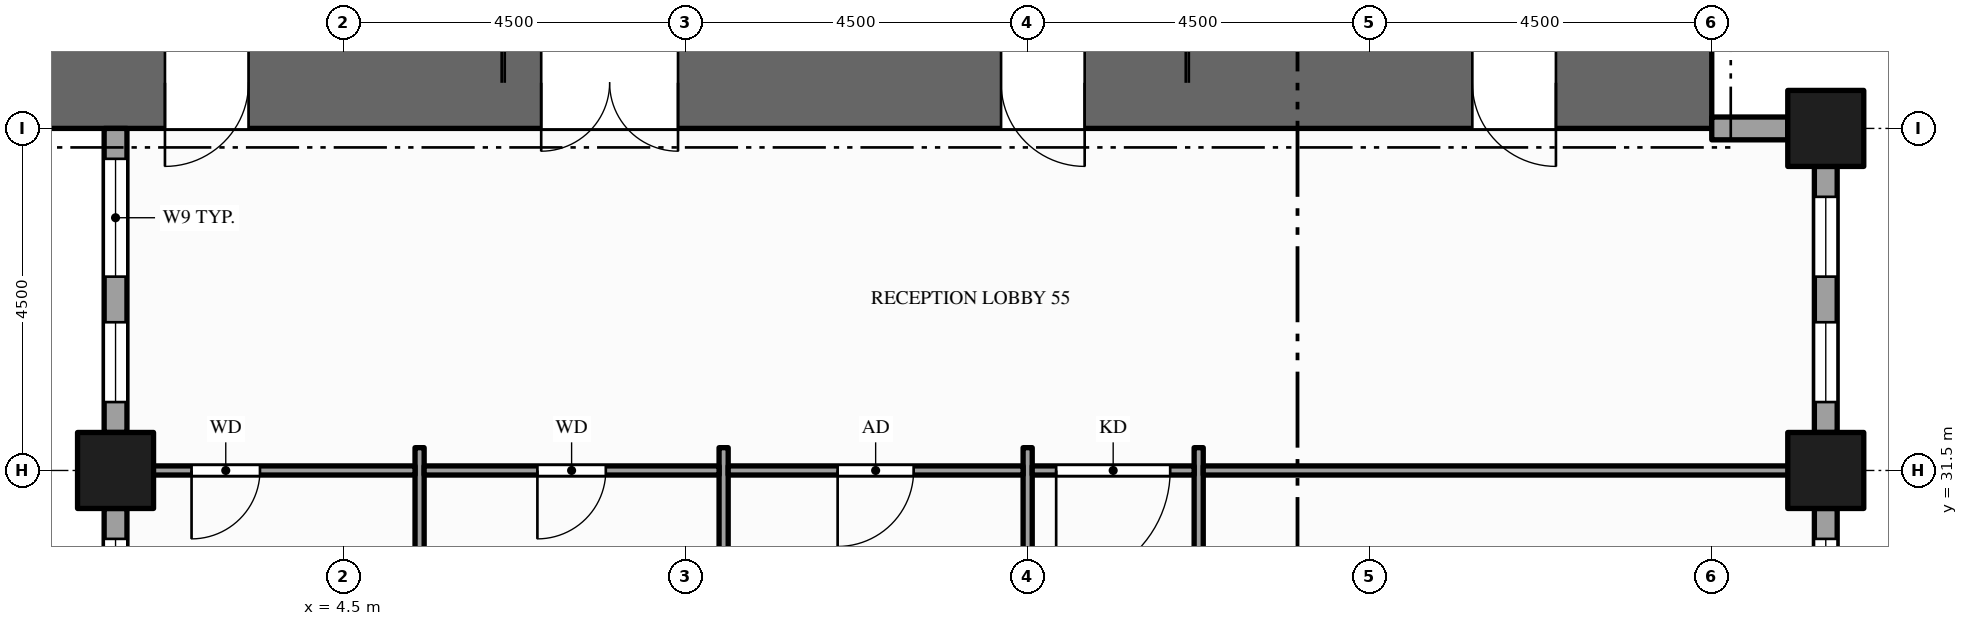
"""IFC4 building model, lengths in metres.
Left out: names, types, materials, properties, quantities, classifications, styles, units other than length and angle.
Written with IfcOpenShell. Run it as: python <this file> out.ifc"""

import sys

from ifc_helpers import new_model, si_unit, direction, frame, frame_2d, origin, origin_2d, place, context, subcontext, project, spatial, rectangle, hollow_rectangle, extrude, element, fill, save


model = new_model("IFC4")
c1 = context("Model", 3, precision=1e-05, world=origin(), true_north=direction((0.0, 1.0)))
c2 = subcontext(c1, "Body", "Model", "MODEL_VIEW")
j1 = project(units=[si_unit("LENGTHUNIT", "METRE"), si_unit("PLANEANGLEUNIT", "RADIAN")], contexts=[c1])
p1 = place(None, origin())
s1 = spatial("IfcSite", under=j1, at=p1, CompositionType="ELEMENT")
p2 = place(p1, origin())
s2 = spatial("IfcBuilding", under=s1, at=p2, CompositionType="ELEMENT")
p3 = place(p2, frame((0.0, 0.0, 119.0)))
s3 = spatial("IfcBuildingStorey", under=s2, at=p3, CompositionType="ELEMENT", Elevation=119.0)
p4 = place(p3, frame((0.0, 36.6, -0.15), z_axis=(0.0, 0.0, 1.0), x_axis=(1.0, 0.0, 0.0)))
e1 = element("IfcWall", 1, at=p4, inside=s3, PredefinedType="SHEAR", context=c2, shape_type="SweptSolid", body=[
    extrude(rectangle(XDim=22.5, YDim=1.2, at=frame_2d((11.25, 0.0))), origin(), (0.0, 0.0, 1.0), 4.0),
])
p5 = place(p4, frame((7.1, 0.0, 0.15)))
e2 = element("IfcOpeningElement", 2, at=p5, cuts=e1, PredefinedType="OPENING", context=c2, shape_type="SweptSolid", body=[
    extrude(rectangle(XDim=1.8, YDim=2.1, at=frame_2d((0.9, 1.05))), frame((0.0, 0.61, 0.0), z_axis=(0.0, -1.0, 0.0), x_axis=(1.0, 0.0, 0.0)), (0.0, 0.0, 1.0), 1.22),
])
p6 = place(p4, frame((13.15, 0.0, 0.15)))
e3 = element("IfcOpeningElement", 3, at=p6, cuts=e1, PredefinedType="OPENING", context=c2, shape_type="SweptSolid", body=[
    extrude(rectangle(XDim=1.1, YDim=2.1, at=frame_2d((0.55, 1.05))), frame((0.0, 0.61, 0.0), z_axis=(0.0, -1.0, 0.0), x_axis=(1.0, 0.0, 0.0)), (0.0, 0.0, 1.0), 1.22),
])
p7 = place(p4, frame((2.15, 0.0, 0.15)))
e4 = element("IfcOpeningElement", 4, at=p7, cuts=e1, PredefinedType="OPENING", context=c2, shape_type="SweptSolid", body=[
    extrude(rectangle(XDim=1.1, YDim=2.1, at=frame_2d((0.55, 1.05))), frame((0.0, 0.61, 0.0), z_axis=(0.0, -1.0, 0.0), x_axis=(1.0, 0.0, 0.0)), (0.0, 0.0, 1.0), 1.22),
])
p8 = place(p4, frame((19.35, 0.0, 0.15)))
e5 = element("IfcOpeningElement", 5, at=p8, cuts=e1, PredefinedType="OPENING", context=c2, shape_type="SweptSolid", body=[
    extrude(rectangle(XDim=1.1, YDim=2.1, at=frame_2d((0.55, 1.05))), frame((0.0, 0.61, 0.0), z_axis=(0.0, -1.0, 0.0), x_axis=(1.0, 0.0, 0.0)), (0.0, 0.0, 1.0), 1.22),
])
for number, where, z_axis, x_axis in (
    (6, (1.5, 31.5, -0.15), (0.0, 0.0, 1.0), (1.0, 0.0, 0.0)),
    (7, (24.0, 31.5, -0.15), (0.0, 0.0, 1.0), (1.0, 0.0, 0.0)),
    (8, (24.0, 36.0, -0.15), (0.0, 0.0, 1.0), (1.0, 0.0, 0.0)),
):
    element("IfcColumn", number, at=place(p3, frame(where, z_axis=z_axis, x_axis=x_axis)), inside=s3, PredefinedType="COLUMN", context=c2, shape_type="SweptSolid", body=[
        extrude(hollow_rectangle(XDim=1.0, YDim=1.0, WallThickness=0.05, at=origin_2d()), origin(), (0.0, 0.0, 1.0), 4.0),
    ])
p9 = place(p3, frame((24.0, 26.0, 0.0), z_axis=(0.0, 0.0, 1.0), x_axis=(0.0, 1.0, 0.0)))
e9 = element("IfcWall", 9, at=p9, inside=s3, PredefinedType="STANDARD", context=c2, shape_type="SweptSolid", body=[
    extrude(rectangle(XDim=5.0, YDim=0.3, at=frame_2d((2.5, 0.0))), origin(), (0.0, 0.0, 1.0), 3.154),
])
p10 = place(p9, frame((1.3, 0.0, 0.9)))
e10 = element("IfcOpeningElement", 10, at=p10, cuts=e9, PredefinedType="OPENING", context=c2, shape_type="SweptSolid", body=[
    extrude(rectangle(XDim=1.65, YDim=2.0, at=frame_2d((0.825, 1.0))), frame((0.0, 0.16, 0.0), z_axis=(0.0, -1.0, 0.0), x_axis=(1.0, 0.0, 0.0)), (0.0, 0.0, 1.0), 0.32),
])
p11 = place(p9, frame((3.55, 0.0, 0.9)))
e11 = element("IfcOpeningElement", 11, at=p11, cuts=e9, PredefinedType="OPENING", context=c2, shape_type="SweptSolid", body=[
    extrude(rectangle(XDim=1.05, YDim=2.0, at=frame_2d((0.525, 1.0))), frame((0.0, 0.16, 0.0), z_axis=(0.0, -1.0, 0.0), x_axis=(1.0, 0.0, 0.0)), (0.0, 0.0, 1.0), 0.32),
])
p12 = place(p3, frame((24.0, 32.0, 0.0), z_axis=(0.0, 0.0, 1.0), x_axis=(0.0, 1.0, 0.0)))
e12 = element("IfcWall", 12, at=p12, inside=s3, PredefinedType="STANDARD", context=c2, shape_type="SweptSolid", body=[
    extrude(rectangle(XDim=3.5, YDim=0.3, at=frame_2d((1.75, 0.0))), origin(), (0.0, 0.0, 1.0), 3.154),
])
p13 = place(p12, frame((0.4, 0.0, 0.9)))
e13 = element("IfcOpeningElement", 13, at=p13, cuts=e12, PredefinedType="OPENING", context=c2, shape_type="SweptSolid", body=[
    extrude(rectangle(XDim=1.05, YDim=2.0, at=frame_2d((0.525, 1.0))), frame((0.0, 0.16, 0.0), z_axis=(0.0, -1.0, 0.0), x_axis=(1.0, 0.0, 0.0)), (0.0, 0.0, 1.0), 0.32),
])
p14 = place(p12, frame((2.05, 0.0, 0.9)))
e14 = element("IfcOpeningElement", 14, at=p14, cuts=e12, PredefinedType="OPENING", context=c2, shape_type="SweptSolid", body=[
    extrude(rectangle(XDim=1.05, YDim=2.0, at=frame_2d((0.525, 1.0))), frame((0.0, 0.16, 0.0), z_axis=(0.0, -1.0, 0.0), x_axis=(1.0, 0.0, 0.0)), (0.0, 0.0, 1.0), 0.32),
])
p15 = place(p3, frame((23.5, 36.0, 0.0), z_axis=(0.0, 0.0, 1.0), x_axis=(-1.0, 0.0, 0.0)))
e15 = element("IfcWall", 15, at=p15, inside=s3, PredefinedType="STANDARD", context=c2, shape_type="SweptSolid", body=[
    extrude(rectangle(XDim=1.0, YDim=0.3, at=frame_2d((0.5, 0.0))), origin(), (0.0, 0.0, 1.0), 2.938),
])
p16 = place(p3, frame((1.5, 36.0, 0.0), z_axis=(0.0, 0.0, 1.0), x_axis=(0.0, -1.0, 0.0)))
e16 = element("IfcWall", 16, at=p16, inside=s3, PredefinedType="STANDARD", context=c2, shape_type="SweptSolid", body=[
    extrude(rectangle(XDim=4.0, YDim=0.3, at=frame_2d((2.0, 0.0))), origin(), (0.0, 0.0, 1.0), 3.154),
])
p17 = place(p16, frame((0.4, 0.0, 0.9)))
e17 = element("IfcOpeningElement", 17, at=p17, cuts=e16, PredefinedType="OPENING", context=c2, shape_type="SweptSolid", body=[
    extrude(rectangle(XDim=1.55, YDim=2.0, at=frame_2d((0.775, 1.0))), frame((0.0, 0.16, 0.0), z_axis=(0.0, -1.0, 0.0), x_axis=(1.0, 0.0, 0.0)), (0.0, 0.0, 1.0), 0.32),
])
p18 = place(p16, frame((2.55, 0.0, 0.9)))
e18 = element("IfcOpeningElement", 18, at=p18, cuts=e16, PredefinedType="OPENING", context=c2, shape_type="SweptSolid", body=[
    extrude(rectangle(XDim=1.05, YDim=2.0, at=frame_2d((0.525, 1.0))), frame((0.0, 0.16, 0.0), z_axis=(0.0, -1.0, 0.0), x_axis=(1.0, 0.0, 0.0)), (0.0, 0.0, 1.0), 0.32),
])
p19 = place(p3, frame((1.5, 31.0, 0.0), z_axis=(0.0, 0.0, 1.0), x_axis=(0.0, -1.0, 0.0)))
e19 = element("IfcWall", 19, at=p19, inside=s3, PredefinedType="STANDARD", context=c2, shape_type="SweptSolid", body=[
    extrude(rectangle(XDim=3.5, YDim=0.3, at=frame_2d((1.75, 0.0))), origin(), (0.0, 0.0, 1.0), 3.154),
])
p20 = place(p19, frame((0.4, 0.0, 0.9)))
e20 = element("IfcOpeningElement", 20, at=p20, cuts=e19, PredefinedType="OPENING", context=c2, shape_type="SweptSolid", body=[
    extrude(rectangle(XDim=1.05, YDim=2.0, at=frame_2d((0.525, 1.0))), frame((0.0, 0.16, 0.0), z_axis=(0.0, -1.0, 0.0), x_axis=(1.0, 0.0, 0.0)), (0.0, 0.0, 1.0), 0.32),
])
p21 = place(p19, frame((2.05, 0.0, 0.9)))
e21 = element("IfcOpeningElement", 21, at=p21, cuts=e19, PredefinedType="OPENING", context=c2, shape_type="SweptSolid", body=[
    extrude(rectangle(XDim=1.05, YDim=2.0, at=frame_2d((0.525, 1.0))), frame((0.0, 0.16, 0.0), z_axis=(0.0, -1.0, 0.0), x_axis=(1.0, 0.0, 0.0)), (0.0, 0.0, 1.0), 0.32),
])
for number, where, z_axis, x_axis in (
    (22, (5.5, 26.7, 0.0), (0.0, 0.0, 1.0), (0.0, 1.0, 0.0)),
    (23, (9.5, 26.7, 0.0), (0.0, 0.0, 1.0), (0.0, 1.0, 0.0)),
):
    element("IfcWall", number, at=place(p3, frame(where, z_axis=z_axis, x_axis=x_axis)), inside=s3, PredefinedType="PARTITIONING", context=c2, shape_type="SweptSolid", body=[
        extrude(rectangle(XDim=5.1, YDim=0.12, at=frame_2d((2.55, 0.0))), origin(), (0.0, 0.0, 1.0), 3.85),
    ])
p22 = place(p3, frame((13.5, 10.95, 0.0), z_axis=(0.0, 0.0, 1.0), x_axis=(0.0, 1.0, 0.0)))
e24 = element("IfcWall", 24, at=p22, inside=s3, PredefinedType="PARTITIONING", context=c2, shape_type="SweptSolid", body=[
    extrude(rectangle(XDim=20.85, YDim=0.12, at=frame_2d((10.425, 0.0))), origin(), (0.0, 0.0, 1.0), 2.6),
])
p23 = place(p22, frame((3.175, 0.0, 0.0)))
e25 = element("IfcOpeningElement", 25, at=p23, cuts=e24, PredefinedType="OPENING", context=c2, shape_type="SweptSolid", body=[
    extrude(rectangle(XDim=1.0, YDim=2.1, at=frame_2d((0.5, 1.05))), frame((0.0, 0.07, 0.0), z_axis=(0.0, -1.0, 0.0), x_axis=(1.0, 0.0, 0.0)), (0.0, 0.0, 1.0), 0.14),
])
p24 = place(p22, frame((10.68, 0.0, 0.0)))
e26 = element("IfcOpeningElement", 26, at=p24, cuts=e24, PredefinedType="OPENING", context=c2, shape_type="SweptSolid", body=[
    extrude(rectangle(XDim=1.8, YDim=2.1, at=frame_2d((0.9, 1.05))), frame((0.0, 0.07, 0.0), z_axis=(0.0, -1.0, 0.0), x_axis=(1.0, 0.0, 0.0)), (0.0, 0.0, 1.0), 0.14),
])
p25 = place(p3, frame((15.75, 10.95, 0.0), z_axis=(0.0, 0.0, 1.0), x_axis=(0.0, 1.0, 0.0)))
e27 = element("IfcWall", 27, at=p25, inside=s3, PredefinedType="PARTITIONING", context=c2, shape_type="SweptSolid", body=[
    extrude(rectangle(XDim=20.85, YDim=0.12, at=frame_2d((10.425, 0.0))), origin(), (0.0, 0.0, 1.0), 2.6),
])
p26 = place(p25, frame((17.8, 0.0, 0.0)))
e28 = element("IfcOpeningElement", 28, at=p26, cuts=e27, PredefinedType="OPENING", context=c2, shape_type="SweptSolid", body=[
    extrude(rectangle(XDim=1.0, YDim=2.1, at=frame_2d((0.5, 1.05))), frame((0.0, 0.07, 0.0), z_axis=(0.0, -1.0, 0.0), x_axis=(1.0, 0.0, 0.0)), (0.0, 0.0, 1.0), 0.14),
])
p27 = place(p25, frame((4.2, 0.0, 0.0)))
e29 = element("IfcOpeningElement", 29, at=p27, cuts=e27, PredefinedType="OPENING", context=c2, shape_type="SweptSolid", body=[
    extrude(rectangle(XDim=1.2, YDim=2.1, at=frame_2d((0.6, 1.05))), frame((0.0, 0.07, 0.0), z_axis=(0.0, -1.0, 0.0), x_axis=(1.0, 0.0, 0.0)), (0.0, 0.0, 1.0), 0.14),
])
p28 = place(p3, frame((1.65, 31.5, 0.0), z_axis=(0.0, 0.0, 1.0), x_axis=(1.0, 0.0, 0.0)))
e30 = element("IfcWall", 30, at=p28, inside=s3, PredefinedType="PARTITIONING", context=c2, shape_type="SweptSolid", body=[
    extrude(rectangle(XDim=3.79, YDim=0.12, at=frame_2d((1.895, 0.0))), origin(), (0.0, 0.0, 1.0), 2.938),
])
p29 = place(p28, frame((0.85, 0.0, 0.0)))
e31 = element("IfcOpeningElement", 31, at=p29, cuts=e30, PredefinedType="OPENING", context=c2, shape_type="SweptSolid", body=[
    extrude(rectangle(XDim=0.9, YDim=2.1, at=frame_2d((0.45, 1.05))), frame((0.0, 0.07, 0.0), z_axis=(0.0, -1.0, 0.0), x_axis=(1.0, 0.0, 0.0)), (0.0, 0.0, 1.0), 0.14),
])
p30 = place(p3, frame((5.56, 31.5, 0.0), z_axis=(0.0, 0.0, 1.0), x_axis=(1.0, 0.0, 0.0)))
e32 = element("IfcWall", 32, at=p30, inside=s3, PredefinedType="PARTITIONING", context=c2, shape_type="SweptSolid", body=[
    extrude(rectangle(XDim=3.88, YDim=0.12, at=frame_2d((1.94, 0.0))), origin(), (0.0, 0.0, 1.0), 2.938),
])
p31 = place(p30, frame((1.49, 0.0, 0.0)))
e33 = element("IfcOpeningElement", 33, at=p31, cuts=e32, PredefinedType="OPENING", context=c2, shape_type="SweptSolid", body=[
    extrude(rectangle(XDim=0.9, YDim=2.1, at=frame_2d((0.45, 1.05))), frame((0.0, 0.07, 0.0), z_axis=(0.0, -1.0, 0.0), x_axis=(1.0, 0.0, 0.0)), (0.0, 0.0, 1.0), 0.14),
])
p32 = place(p3, frame((9.56, 31.5, 0.0), z_axis=(0.0, 0.0, 1.0), x_axis=(1.0, 0.0, 0.0)))
e34 = element("IfcWall", 34, at=p32, inside=s3, PredefinedType="PARTITIONING", context=c2, shape_type="SweptSolid", body=[
    extrude(rectangle(XDim=3.88, YDim=0.12, at=frame_2d((1.94, 0.0))), origin(), (0.0, 0.0, 1.0), 2.938),
])
p33 = place(p32, frame((1.44, 0.0, 0.0)))
e35 = element("IfcOpeningElement", 35, at=p33, cuts=e34, PredefinedType="OPENING", context=c2, shape_type="SweptSolid", body=[
    extrude(rectangle(XDim=1.0, YDim=2.1, at=frame_2d((0.5, 1.05))), frame((0.0, 0.07, 0.0), z_axis=(0.0, -1.0, 0.0), x_axis=(1.0, 0.0, 0.0)), (0.0, 0.0, 1.0), 0.14),
])
p34 = place(p3, frame((13.56, 31.5, 0.0), z_axis=(0.0, 0.0, 1.0), x_axis=(1.0, 0.0, 0.0)))
e36 = element("IfcWall", 36, at=p34, inside=s3, PredefinedType="PARTITIONING", context=c2, shape_type="SweptSolid", body=[
    extrude(rectangle(XDim=2.13, YDim=0.12, at=frame_2d((1.065, 0.0))), origin(), (0.0, 0.0, 1.0), 2.938),
])
p35 = place(p34, frame((0.315, 0.0, 0.0)))
e37 = element("IfcOpeningElement", 37, at=p35, cuts=e36, PredefinedType="OPENING", context=c2, shape_type="SweptSolid", body=[
    extrude(rectangle(XDim=1.5, YDim=2.1, at=frame_2d((0.75, 1.05))), frame((0.0, 0.07, 0.0), z_axis=(0.0, -1.0, 0.0), x_axis=(1.0, 0.0, 0.0)), (0.0, 0.0, 1.0), 0.14),
])
p36 = place(p3, frame((15.81, 31.5, 0.0), z_axis=(0.0, 0.0, 1.0), x_axis=(1.0, 0.0, 0.0)))
e38 = element("IfcWall", 38, at=p36, inside=s3, PredefinedType="PARTITIONING", context=c2, shape_type="SweptSolid", body=[
    extrude(rectangle(XDim=8.04, YDim=0.12, at=frame_2d((4.02, 0.0))), origin(), (0.0, 0.0, 1.0), 2.938),
])
p37 = place(p11, origin())
e39 = element("IfcWindow", 39, at=p37, inside=s3, PartitioningType="SINGLE_PANEL", PredefinedType="WINDOW", context=c2, shape_type="SweptSolid", body=[
    extrude(rectangle(XDim=1.05, YDim=2.0, at=frame_2d((0.525, 1.0))), frame((0.0, 0.03, 0.0), z_axis=(0.0, -1.0, 0.0), x_axis=(1.0, 0.0, 0.0)), (0.0, 0.0, 1.0), 0.06),
])
fill(e11, e39)
p38 = place(p13, origin())
e40 = element("IfcWindow", 40, at=p38, inside=s3, PartitioningType="SINGLE_PANEL", PredefinedType="WINDOW", context=c2, shape_type="SweptSolid", body=[
    extrude(rectangle(XDim=1.05, YDim=2.0, at=frame_2d((0.525, 1.0))), frame((0.0, 0.03, 0.0), z_axis=(0.0, -1.0, 0.0), x_axis=(1.0, 0.0, 0.0)), (0.0, 0.0, 1.0), 0.06),
])
fill(e13, e40)
p39 = place(p14, origin())
e41 = element("IfcWindow", 41, at=p39, inside=s3, PartitioningType="SINGLE_PANEL", PredefinedType="WINDOW", context=c2, shape_type="SweptSolid", body=[
    extrude(rectangle(XDim=1.05, YDim=2.0, at=frame_2d((0.525, 1.0))), frame((0.0, 0.03, 0.0), z_axis=(0.0, -1.0, 0.0), x_axis=(1.0, 0.0, 0.0)), (0.0, 0.0, 1.0), 0.06),
])
fill(e14, e41)
p40 = place(p17, origin())
e42 = element("IfcWindow", 42, at=p40, inside=s3, PartitioningType="SINGLE_PANEL", PredefinedType="WINDOW", context=c2, shape_type="SweptSolid", body=[
    extrude(rectangle(XDim=1.55, YDim=2.0, at=frame_2d((0.775, 1.0))), frame((0.0, 0.03, 0.0), z_axis=(0.0, -1.0, 0.0), x_axis=(1.0, 0.0, 0.0)), (0.0, 0.0, 1.0), 0.06),
])
fill(e17, e42)
p41 = place(p18, origin())
e43 = element("IfcWindow", 43, at=p41, inside=s3, PartitioningType="SINGLE_PANEL", PredefinedType="WINDOW", context=c2, shape_type="SweptSolid", body=[
    extrude(rectangle(XDim=1.05, YDim=2.0, at=frame_2d((0.525, 1.0))), frame((0.0, 0.03, 0.0), z_axis=(0.0, -1.0, 0.0), x_axis=(1.0, 0.0, 0.0)), (0.0, 0.0, 1.0), 0.06),
])
fill(e18, e43)
p42 = place(p20, origin())
e44 = element("IfcWindow", 44, at=p42, inside=s3, PartitioningType="SINGLE_PANEL", PredefinedType="WINDOW", context=c2, shape_type="SweptSolid", body=[
    extrude(rectangle(XDim=1.05, YDim=2.0, at=frame_2d((0.525, 1.0))), frame((0.0, 0.03, 0.0), z_axis=(0.0, -1.0, 0.0), x_axis=(1.0, 0.0, 0.0)), (0.0, 0.0, 1.0), 0.06),
])
fill(e20, e44)
p43 = place(p5, origin())
e45 = element("IfcDoor", 45, at=p43, inside=s3, OperationType="DOUBLE_DOOR_SINGLE_SWING", PredefinedType="DOOR", context=c2, shape_type="SweptSolid", body=[
    extrude(rectangle(XDim=1.8, YDim=2.1, at=frame_2d((0.9, 1.05))), frame((0.0, 0.025, 0.0), z_axis=(0.0, -1.0, 0.0), x_axis=(1.0, 0.0, 0.0)), (0.0, 0.0, 1.0), 0.05),
])
fill(e2, e45)
p44 = place(p6, origin())
e46 = element("IfcDoor", 46, at=p44, inside=s3, OperationType="SINGLE_SWING_RIGHT", PredefinedType="DOOR", context=c2, shape_type="SweptSolid", body=[
    extrude(rectangle(XDim=1.1, YDim=2.1, at=frame_2d((0.55, 1.05))), frame((0.0, 0.025, 0.0), z_axis=(0.0, -1.0, 0.0), x_axis=(1.0, 0.0, 0.0)), (0.0, 0.0, 1.0), 0.05),
])
fill(e3, e46)
p45 = place(p7, origin())
e47 = element("IfcDoor", 47, at=p45, inside=s3, OperationType="SINGLE_SWING_LEFT", PredefinedType="DOOR", context=c2, shape_type="SweptSolid", body=[
    extrude(rectangle(XDim=1.1, YDim=2.1, at=frame_2d((0.55, 1.05))), frame((0.0, 0.025, 0.0), z_axis=(0.0, -1.0, 0.0), x_axis=(1.0, 0.0, 0.0)), (0.0, 0.0, 1.0), 0.05),
])
fill(e4, e47)
p46 = place(p8, origin())
e48 = element("IfcDoor", 48, at=p46, inside=s3, OperationType="SINGLE_SWING_RIGHT", PredefinedType="DOOR", context=c2, shape_type="SweptSolid", body=[
    extrude(rectangle(XDim=1.1, YDim=2.1, at=frame_2d((0.55, 1.05))), frame((0.0, 0.025, 0.0), z_axis=(0.0, -1.0, 0.0), x_axis=(1.0, 0.0, 0.0)), (0.0, 0.0, 1.0), 0.05),
])
fill(e5, e48)
p47 = place(p35, origin())
e49 = element("IfcDoor", 49, at=p47, inside=s3, OperationType="SINGLE_SWING_LEFT", PredefinedType="DOOR", context=c2, shape_type="SweptSolid", body=[
    extrude(rectangle(XDim=1.5, YDim=2.1, at=frame_2d((0.75, 1.05))), frame((0.0, 0.025, 0.0), z_axis=(0.0, -1.0, 0.0), x_axis=(1.0, 0.0, 0.0)), (0.0, 0.0, 1.0), 0.05),
])
fill(e37, e49)
p48 = place(p29, origin())
e50 = element("IfcDoor", 50, at=p48, inside=s3, OperationType="SINGLE_SWING_LEFT", PredefinedType="DOOR", context=c2, shape_type="SweptSolid", body=[
    extrude(rectangle(XDim=0.9, YDim=2.1, at=frame_2d((0.45, 1.05))), frame((0.0, 0.025, 0.0), z_axis=(0.0, -1.0, 0.0), x_axis=(1.0, 0.0, 0.0)), (0.0, 0.0, 1.0), 0.05),
])
fill(e31, e50)
p49 = place(p31, origin())
e51 = element("IfcDoor", 51, at=p49, inside=s3, OperationType="SINGLE_SWING_LEFT", PredefinedType="DOOR", context=c2, shape_type="SweptSolid", body=[
    extrude(rectangle(XDim=0.9, YDim=2.1, at=frame_2d((0.45, 1.05))), frame((0.0, 0.025, 0.0), z_axis=(0.0, -1.0, 0.0), x_axis=(1.0, 0.0, 0.0)), (0.0, 0.0, 1.0), 0.05),
])
fill(e33, e51)
p50 = place(p33, origin())
e52 = element("IfcDoor", 52, at=p50, inside=s3, OperationType="SINGLE_SWING_LEFT", PredefinedType="DOOR", context=c2, shape_type="SweptSolid", body=[
    extrude(rectangle(XDim=1.0, YDim=2.1, at=frame_2d((0.5, 1.05))), frame((0.0, 0.025, 0.0), z_axis=(0.0, -1.0, 0.0), x_axis=(1.0, 0.0, 0.0)), (0.0, 0.0, 1.0), 0.05),
])
fill(e35, e52)
save(model, sys.argv[1])
